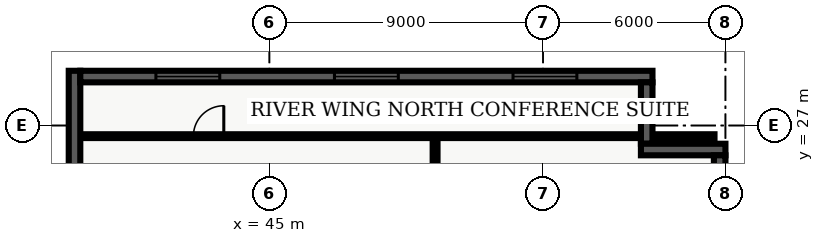
"""IFC4 building model, lengths in metres.
Left out: names, types, materials, properties, quantities, classifications, styles, units other than length and angle.
Written with IfcOpenShell. Run it as: python <this file> out.ifc"""

import sys

from ifc_helpers import new_model, entity, si_unit, converted_unit, direction, frame, origin_with_axes, origin_2d_with_axis, place, context, subcontext, project, spatial, polyline, rectangle, outline, extrude, element, fill, save


model = new_model("IFC4")
c1 = context("Model", 3, precision=1e-05, world=origin_with_axes(), true_north=direction((0.0, 1.0)))
c2 = subcontext(c1, "Body", "Model", "MODEL_VIEW")
j1 = project(units=[si_unit("LENGTHUNIT", "METRE"), converted_unit("PLANEANGLEUNIT", "DEGREE", entity("IfcPlaneAngleMeasure", 0.017), si_unit("PLANEANGLEUNIT", "RADIAN"), dimensions=[0, 0, 0, 0, 0, 0, 0])], contexts=[c1])
p1 = place(None, origin_with_axes())
s1 = spatial("IfcSite", under=j1, at=p1, CompositionType="ELEMENT")
p2 = place(p1, origin_with_axes())
s2 = spatial("IfcBuilding", under=s1, at=p2, CompositionType="ELEMENT")
p3 = place(p2, frame((0.0, 0.0, 84.6), z_axis=(0.0, 0.0, 1.0), x_axis=(1.0, 0.0, 0.0)))
s3 = spatial("IfcBuildingStorey", under=s2, at=p3, CompositionType="ELEMENT", Elevation=84.6)
p4 = place(p3, frame((50.45, 7.85, 0.0), z_axis=(0.0, 0.0, 1.0), x_axis=(0.0, 1.0, 0.0)))
e1 = element("IfcWall", 1, at=p4, inside=s3, PredefinedType="PARTITIONING", context=c2, shape_type="SweptSolid", body=[
    extrude(outline(polyline([(0.0, -0.08), (18.8, -0.08), (18.8, 0.08), (0.0, 0.08), (0.0, -0.08)])), origin_with_axes(), (0.0, 0.0, 1.0), 3.2),
])
p5 = place(p4, frame((4.293, 0.0, 0.0), z_axis=(0.0, 0.0, 1.0), x_axis=(1.0, 0.0, 0.0)))
e2 = element("IfcOpeningElement", 2, at=p5, cuts=e1, PredefinedType="OPENING", context=c2, shape_type="SweptSolid", body=[
    extrude(rectangle(XDim=1.0, YDim=0.18, at=origin_2d_with_axis()), origin_with_axes(), (0.0, 0.0, 1.0), 2.15),
])
p6 = place(p4, frame((13.633, 0.0, 0.0), z_axis=(0.0, 0.0, 1.0), x_axis=(1.0, 0.0, 0.0)))
e3 = element("IfcOpeningElement", 3, at=p6, cuts=e1, PredefinedType="OPENING", context=c2, shape_type="SweptSolid", body=[
    extrude(rectangle(XDim=1.0, YDim=0.18, at=origin_2d_with_axis()), origin_with_axes(), (0.0, 0.0, 1.0), 2.15),
])
p7 = place(p3, frame((38.76, 26.65, 0.0), z_axis=(0.0, 0.0, 1.0), x_axis=(1.0, 0.0, 0.0)))
e4 = element("IfcWall", 4, at=p7, inside=s3, PredefinedType="PARTITIONING", context=c2, shape_type="SweptSolid", body=[
    extrude(outline(polyline([(0.0, -0.062), (20.88, -0.062), (20.88, 0.062), (0.0, 0.062), (0.0, -0.062)])), origin_with_axes(), (0.0, 0.0, 1.0), 3.2),
])
p8 = place(p7, frame((4.24, 0.0, 0.0), z_axis=(0.0, 0.0, 1.0), x_axis=(1.0, 0.0, 0.0)))
e5 = element("IfcOpeningElement", 5, at=p8, cuts=e4, PredefinedType="OPENING", context=c2, shape_type="SweptSolid", body=[
    extrude(rectangle(XDim=1.0, YDim=0.145, at=origin_2d_with_axis()), origin_with_axes(), (0.0, 0.0, 1.0), 2.15),
])
p9 = place(p3, frame((38.59, 21.22, 0.0), z_axis=(0.0, 0.0, 1.0), x_axis=(0.0, 1.0, 0.0)))
e6 = element("IfcWall", 6, at=p9, inside=s3, PredefinedType="SOLIDWALL", context=c2, shape_type="SweptSolid", body=[
    extrude(outline(polyline([(0.0, -0.19), (7.58, -0.19), (7.58, 0.19), (0.0, 0.19), (0.0, -0.19)])), origin_with_axes(), (0.0, 0.0, 1.0), 4.26),
])
p10 = place(p3, frame((38.78, 28.61, 0.0), z_axis=(0.0, 0.0, 1.0), x_axis=(1.0, 0.0, 0.0)))
e7 = element("IfcWall", 7, at=p10, inside=s3, PredefinedType="SOLIDWALL", context=c2, shape_type="SweptSolid", body=[
    extrude(outline(polyline([(0.0, -0.19), (18.82, -0.19), (18.82, 0.19), (0.0, 0.19), (0.0, -0.19)])), origin_with_axes(), (0.0, 0.0, 1.0), 4.26),
])
p11 = place(p10, frame((3.537, 0.0, 0.45), z_axis=(0.0, 0.0, 1.0), x_axis=(1.0, 0.0, 0.0)))
e8 = element("IfcOpeningElement", 8, at=p11, cuts=e7, PredefinedType="OPENING", context=c2, shape_type="SweptSolid", body=[
    extrude(rectangle(XDim=2.1, YDim=0.4, at=origin_2d_with_axis()), origin_with_axes(), (0.0, 0.0, 1.0), 2.2),
])
p12 = place(p10, frame((9.41, 0.0, 0.45), z_axis=(0.0, 0.0, 1.0), x_axis=(1.0, 0.0, 0.0)))
e9 = element("IfcOpeningElement", 9, at=p12, cuts=e7, PredefinedType="OPENING", context=c2, shape_type="SweptSolid", body=[
    extrude(rectangle(XDim=2.1, YDim=0.4, at=origin_2d_with_axis()), origin_with_axes(), (0.0, 0.0, 1.0), 2.2),
])
p13 = place(p10, frame((15.283, 0.0, 0.45), z_axis=(0.0, 0.0, 1.0), x_axis=(1.0, 0.0, 0.0)))
e10 = element("IfcOpeningElement", 10, at=p13, cuts=e7, PredefinedType="OPENING", context=c2, shape_type="SweptSolid", body=[
    extrude(rectangle(XDim=2.1, YDim=0.4, at=origin_2d_with_axis()), origin_with_axes(), (0.0, 0.0, 1.0), 2.2),
])
p14 = place(p3, frame((57.41, 28.42, 0.0), z_axis=(0.0, 0.0, 1.0), x_axis=(0.0, -1.0, 0.0)))
e11 = element("IfcWall", 11, at=p14, inside=s3, PredefinedType="SOLIDWALL", context=c2, shape_type="SweptSolid", body=[
    extrude(outline(polyline([(0.0, -0.19), (2.02, -0.19), (2.02, 0.19), (0.0, 0.19), (0.0, -0.19)])), origin_with_axes(), (0.0, 0.0, 1.0), 4.26),
])
p15 = place(p3, frame((57.22, 26.21, 0.0), z_axis=(0.0, 0.0, 1.0), x_axis=(1.0, 0.0, 0.0)))
e12 = element("IfcWall", 12, at=p15, inside=s3, PredefinedType="SOLIDWALL", context=c2, shape_type="SweptSolid", body=[
    extrude(outline(polyline([(0.0, -0.19), (2.78, -0.19), (2.78, 0.19), (0.0, 0.19), (0.0, -0.19)])), origin_with_axes(), (0.0, 0.0, 1.0), 4.26),
])
p16 = place(p3, frame((59.81, 26.02, 0.0), z_axis=(0.0, 0.0, 1.0), x_axis=(0.0, -1.0, 0.0)))
e13 = element("IfcWall", 13, at=p16, inside=s3, PredefinedType="SOLIDWALL", context=c2, shape_type="SweptSolid", body=[
    extrude(outline(polyline([(0.0, -0.19), (23.62, -0.19), (23.62, 0.19), (0.0, 0.19), (0.0, -0.19)])), origin_with_axes(), (0.0, 0.0, 1.0), 4.26),
])
p17 = place(p16, frame((3.853, 0.0, 0.45), z_axis=(0.0, 0.0, 1.0), x_axis=(1.0, 0.0, 0.0)))
e14 = element("IfcOpeningElement", 14, at=p17, cuts=e13, PredefinedType="OPENING", context=c2, shape_type="SweptSolid", body=[
    extrude(rectangle(XDim=2.1, YDim=0.4, at=origin_2d_with_axis()), origin_with_axes(), (0.0, 0.0, 1.0), 2.2),
])
p18 = place(p16, frame((20.218, 0.0, 0.45), z_axis=(0.0, 0.0, 1.0), x_axis=(1.0, 0.0, 0.0)))
e15 = element("IfcOpeningElement", 15, at=p18, cuts=e13, PredefinedType="OPENING", context=c2, shape_type="SweptSolid", body=[
    extrude(rectangle(XDim=2.1, YDim=0.4, at=origin_2d_with_axis()), origin_with_axes(), (0.0, 0.0, 1.0), 2.2),
])
p19 = place(p7, frame((4.24, 0.0, 0.0), z_axis=(0.0, 0.0, 1.0), x_axis=(1.0, 0.0, 0.0)))
e16 = element("IfcDoor", 16, at=p19, inside=s3, OperationType="SINGLE_SWING_RIGHT", PredefinedType="DOOR", context=c2, shape_type="SweptSolid", body=[
    extrude(rectangle(XDim=1.0, YDim=0.075, at=origin_2d_with_axis()), origin_with_axes(), (0.0, 0.0, 1.0), 2.15),
])
fill(e5, e16)
p20 = place(p10, frame((3.537, 0.0, 0.45), z_axis=(0.0, 0.0, 1.0), x_axis=(1.0, 0.0, 0.0)))
e17 = element("IfcWindow", 17, at=p20, inside=s3, PredefinedType="WINDOW", context=c2, shape_type="SweptSolid", body=[
    extrude(rectangle(XDim=2.1, YDim=0.09, at=origin_2d_with_axis()), origin_with_axes(), (0.0, 0.0, 1.0), 2.2),
])
fill(e8, e17)
p21 = place(p10, frame((9.41, 0.0, 0.45), z_axis=(0.0, 0.0, 1.0), x_axis=(1.0, 0.0, 0.0)))
e18 = element("IfcWindow", 18, at=p21, inside=s3, PredefinedType="WINDOW", context=c2, shape_type="SweptSolid", body=[
    extrude(rectangle(XDim=2.1, YDim=0.09, at=origin_2d_with_axis()), origin_with_axes(), (0.0, 0.0, 1.0), 2.2),
])
fill(e9, e18)
p22 = place(p10, frame((15.283, 0.0, 0.45), z_axis=(0.0, 0.0, 1.0), x_axis=(1.0, 0.0, 0.0)))
e19 = element("IfcWindow", 19, at=p22, inside=s3, PredefinedType="WINDOW", context=c2, shape_type="SweptSolid", body=[
    extrude(rectangle(XDim=2.1, YDim=0.09, at=origin_2d_with_axis()), origin_with_axes(), (0.0, 0.0, 1.0), 2.2),
])
fill(e10, e19)
save(model, sys.argv[1])
